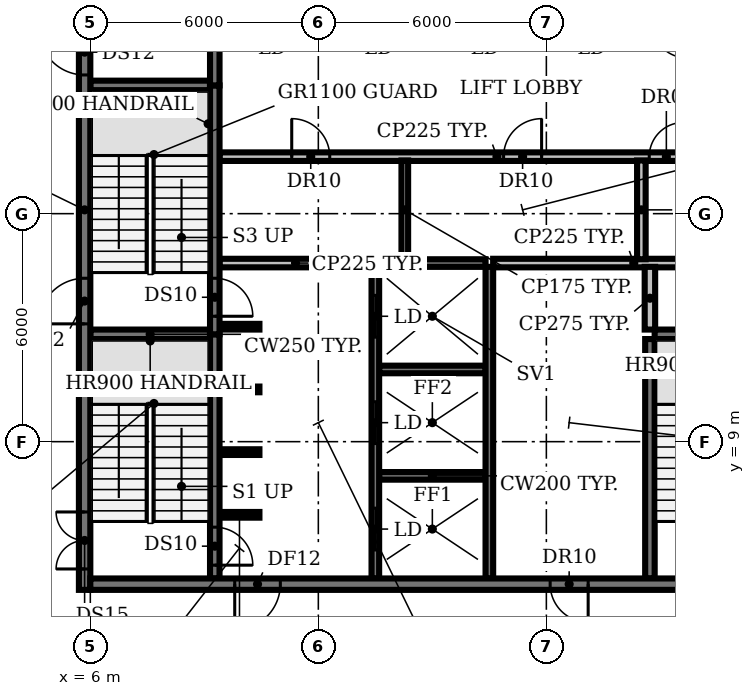
"""IFC4 building model, lengths in metres.
Left out: names, types, materials, properties, quantities, classifications, styles, units other than length and angle.
Written with IfcOpenShell. Run it as: python <this file> out.ifc"""

import sys

from ifc_helpers import new_model, si_unit, direction, frame, frame_2d, origin, place, context, subcontext, project, spatial, rectangle, extrude, element, fill, save


model = new_model("IFC4")
c1 = context("Model", 3, precision=1e-05, world=origin(), true_north=direction((0.0, 1.0)))
c2 = subcontext(c1, "Body", "Model", "MODEL_VIEW")
j1 = project(units=[si_unit("LENGTHUNIT", "METRE"), si_unit("PLANEANGLEUNIT", "RADIAN")], contexts=[c1])
p1 = place(None, origin())
s1 = spatial("IfcSite", under=j1, at=p1, CompositionType="ELEMENT")
p2 = place(p1, origin())
s2 = spatial("IfcBuilding", under=s1, at=p2, CompositionType="ELEMENT")
p3 = place(p2, frame((0.0, 0.0, 264.2)))
s3 = spatial("IfcBuildingStorey", under=s2, at=p3, CompositionType="ELEMENT", Elevation=264.2)
p4 = place(p3, frame((9.4, 7.075, 0.0), z_axis=(0.0, 0.0, 1.0), x_axis=(1.0, 0.0, 0.0)))
e1 = element("IfcWall", 1, at=p4, inside=s3, PredefinedType="SHEAR", context=c2, shape_type="SweptSolid", body=[
    extrude(rectangle(XDim=1.05, YDim=0.15, at=frame_2d((0.525, 0.0))), origin(), (0.0, 0.0, 1.0), 3.85),
])
p5 = place(p3, frame((13.6, 8.1, 0.0), z_axis=(0.0, 0.0, 1.0), x_axis=(1.0, 0.0, 0.0)))
e2 = element("IfcWall", 2, at=p5, inside=s3, PredefinedType="SHEAR", context=c2, shape_type="SweptSolid", body=[
    extrude(rectangle(XDim=2.8, YDim=0.2, at=frame_2d((1.4, 0.0))), origin(), (0.0, 0.0, 1.0), 3.85),
])
for number, where, z_axis, x_axis in (
    (3, (9.4, 8.725, 0.0), (0.0, 0.0, 1.0), (1.0, 0.0, 0.0)),
    (4, (9.4, 10.375, 0.0), (0.0, 0.0, 1.0), (1.0, 0.0, 0.0)),
):
    element("IfcWall", number, at=place(p3, frame(where, z_axis=z_axis, x_axis=x_axis)), inside=s3, PredefinedType="SHEAR", context=c2, shape_type="SweptSolid", body=[
        extrude(rectangle(XDim=1.05, YDim=0.15, at=frame_2d((0.525, 0.0))), origin(), (0.0, 0.0, 1.0), 3.85),
    ])
p6 = place(p3, frame((13.6, 10.9, 0.0), z_axis=(0.0, 0.0, 1.0), x_axis=(1.0, 0.0, 0.0)))
e5 = element("IfcWall", 5, at=p6, inside=s3, PredefinedType="SHEAR", context=c2, shape_type="SweptSolid", body=[
    extrude(rectangle(XDim=2.8, YDim=0.2, at=frame_2d((1.4, 0.0))), origin(), (0.0, 0.0, 1.0), 3.85),
])
for number, where, z_axis, x_axis in (
    (6, (6.0, 11.825, 0.0), (0.0, 0.0, 1.0), (1.0, 0.0, 0.0)),
    (7, (20.85, 11.825, 0.0), (0.0, 0.0, 1.0), (1.0, 0.0, 0.0)),
):
    element("IfcWall", number, at=place(p3, frame(where, z_axis=z_axis, x_axis=x_axis)), inside=s3, PredefinedType="SHEAR", context=c2, shape_type="SweptSolid", body=[
        extrude(rectangle(XDim=3.15, YDim=0.25, at=frame_2d((1.575, 0.0))), origin(), (0.0, 0.0, 1.0), 3.85),
    ])
p7 = place(p3, frame((9.4, 12.025, 0.0), z_axis=(0.0, 0.0, 1.0), x_axis=(1.0, 0.0, 0.0)))
e8 = element("IfcWall", 8, at=p7, inside=s3, PredefinedType="SHEAR", context=c2, shape_type="SweptSolid", body=[
    extrude(rectangle(XDim=1.05, YDim=0.15, at=frame_2d((0.525, 0.0))), origin(), (0.0, 0.0, 1.0), 3.85),
])
p8 = place(p3, frame((9.4, 13.7, 0.0), z_axis=(0.0, 0.0, 1.0), x_axis=(1.0, 0.0, 0.0)))
e9 = element("IfcWall", 9, at=p8, inside=s3, PredefinedType="PARTITIONING", context=c2, shape_type="SweptSolid", body=[
    extrude(rectangle(XDim=4.0, YDim=0.225, at=frame_2d((2.0, 0.0))), origin(), (0.0, 0.0, 1.0), 3.85),
])
p9 = place(p3, frame((13.6, 13.7, 0.0), z_axis=(0.0, 0.0, 1.0), x_axis=(1.0, 0.0, 0.0)))
e10 = element("IfcWall", 10, at=p9, inside=s3, PredefinedType="SHEAR", context=c2, shape_type="SweptSolid", body=[
    extrude(rectangle(XDim=2.8, YDim=0.2, at=frame_2d((1.4, 0.0))), origin(), (0.0, 0.0, 1.0), 3.85),
])
p10 = place(p3, frame((16.6, 13.7, 0.0), z_axis=(0.0, 0.0, 1.0), x_axis=(1.0, 0.0, 0.0)))
e11 = element("IfcWall", 11, at=p10, inside=s3, PredefinedType="PARTITIONING", context=c2, shape_type="SweptSolid", body=[
    extrude(rectangle(XDim=7.4, YDim=0.225, at=frame_2d((3.7, 0.0))), origin(), (0.0, 0.0, 1.0), 3.85),
])
p11 = place(p3, frame((9.4, 16.5, 0.0), z_axis=(0.0, 0.0, 1.0), x_axis=(1.0, 0.0, 0.0)))
e12 = element("IfcWall", 12, at=p11, inside=s3, PredefinedType="PARTITIONING", context=c2, shape_type="SweptSolid", body=[
    extrude(rectangle(XDim=14.6, YDim=0.225, at=frame_2d((7.3, 0.0))), origin(), (0.0, 0.0, 1.0), 3.85),
])
p12 = place(p11, frame((1.9, 0.0, 0.0)))
e13 = element("IfcOpeningElement", 13, at=p12, cuts=e12, PredefinedType="OPENING", context=c2, shape_type="SweptSolid", body=[
    extrude(rectangle(XDim=1.0, YDim=2.1, at=frame_2d((0.5, 1.05))), frame((0.0, 0.123, 0.0), z_axis=(0.0, -1.0, 0.0), x_axis=(1.0, 0.0, 0.0)), (0.0, 0.0, 1.0), 0.245),
])
p13 = place(p11, frame((7.475, 0.0, 0.0)))
e14 = element("IfcOpeningElement", 14, at=p13, cuts=e12, PredefinedType="OPENING", context=c2, shape_type="SweptSolid", body=[
    extrude(rectangle(XDim=1.0, YDim=2.1, at=frame_2d((0.5, 1.05))), frame((0.0, 0.123, 0.0), z_axis=(0.0, -1.0, 0.0), x_axis=(1.0, 0.0, 0.0)), (0.0, 0.0, 1.0), 0.245),
])
p14 = place(p11, frame((11.308, 0.0, 0.0)))
e15 = element("IfcOpeningElement", 15, at=p14, cuts=e12, PredefinedType="OPENING", context=c2, shape_type="SweptSolid", body=[
    extrude(rectangle(XDim=0.9, YDim=2.1, at=frame_2d((0.45, 1.05))), frame((0.0, 0.123, 0.0), z_axis=(0.0, -1.0, 0.0), x_axis=(1.0, 0.0, 0.0)), (0.0, 0.0, 1.0), 0.245),
])
p15 = place(p11, frame((13.083, 0.0, 0.0)))
e16 = element("IfcOpeningElement", 16, at=p15, cuts=e12, PredefinedType="OPENING", context=c2, shape_type="SweptSolid", body=[
    extrude(rectangle(XDim=0.9, YDim=2.1, at=frame_2d((0.45, 1.05))), frame((0.0, 0.123, 0.0), z_axis=(0.0, -1.0, 0.0), x_axis=(1.0, 0.0, 0.0)), (0.0, 0.0, 1.0), 0.245),
])
p16 = place(p3, frame((6.0, 18.375, 0.0), z_axis=(0.0, 0.0, 1.0), x_axis=(1.0, 0.0, 0.0)))
e17 = element("IfcWall", 17, at=p16, inside=s3, PredefinedType="SHEAR", context=c2, shape_type="SweptSolid", body=[
    extrude(rectangle(XDim=3.15, YDim=0.25, at=frame_2d((1.575, 0.0))), origin(), (0.0, 0.0, 1.0), 3.85),
])
p17 = place(p3, frame((9.275, 11.825, 0.0), z_axis=(0.0, 0.0, 1.0), x_axis=(0.0, -1.0, 0.0)))
e18 = element("IfcWall", 18, at=p17, inside=s3, PredefinedType="SHEAR", context=c2, shape_type="SweptSolid", body=[
    extrude(rectangle(XDim=6.425, YDim=0.25, at=frame_2d((3.212, 0.0))), origin(), (0.0, 0.0, 1.0), 3.85),
])
p18 = place(p17, frame((5.075, 0.0, 0.0)))
e19 = element("IfcOpeningElement", 19, at=p18, cuts=e18, PredefinedType="OPENING", context=c2, shape_type="SweptSolid", body=[
    extrude(rectangle(XDim=1.0, YDim=2.1, at=frame_2d((0.5, 1.05))), frame((0.0, 0.135, 0.0), z_axis=(0.0, -1.0, 0.0), x_axis=(1.0, 0.0, 0.0)), (0.0, 0.0, 1.0), 0.27),
])
p19 = place(p3, frame((9.275, 18.375, 0.0), z_axis=(0.0, 0.0, 1.0), x_axis=(0.0, -1.0, 0.0)))
e20 = element("IfcWall", 20, at=p19, inside=s3, PredefinedType="SHEAR", context=c2, shape_type="SweptSolid", body=[
    extrude(rectangle(XDim=6.55, YDim=0.25, at=frame_2d((3.275, 0.0))), origin(), (0.0, 0.0, 1.0), 3.85),
])
p20 = place(p19, frame((5.075, 0.0, 0.0)))
e21 = element("IfcOpeningElement", 21, at=p20, cuts=e20, PredefinedType="OPENING", context=c2, shape_type="SweptSolid", body=[
    extrude(rectangle(XDim=1.0, YDim=2.1, at=frame_2d((0.5, 1.05))), frame((0.0, 0.135, 0.0), z_axis=(0.0, -1.0, 0.0), x_axis=(1.0, 0.0, 0.0)), (0.0, 0.0, 1.0), 0.27),
])
p21 = place(p3, frame((9.275, 18.375, 0.0), z_axis=(0.0, 0.0, 1.0), x_axis=(0.0, 1.0, 0.0)))
e22 = element("IfcWall", 22, at=p21, inside=s3, PredefinedType="SHEAR", context=c2, shape_type="SweptSolid", body=[
    extrude(rectangle(XDim=6.425, YDim=0.25, at=frame_2d((3.212, 0.0))), origin(), (0.0, 0.0, 1.0), 3.85),
])
p22 = place(p3, frame((13.5, 5.4, 0.0), z_axis=(0.0, 0.0, 1.0), x_axis=(0.0, 1.0, 0.0)))
e23 = element("IfcWall", 23, at=p22, inside=s3, PredefinedType="SHEAR", context=c2, shape_type="SweptSolid", body=[
    extrude(rectangle(XDim=8.2, YDim=0.2, at=frame_2d((4.1, 0.0))), origin(), (0.0, 0.0, 1.0), 3.85),
])
p23 = place(p22, frame((0.75, 0.0, 0.0)))
e24 = element("IfcOpeningElement", 24, at=p23, cuts=e23, PredefinedType="OPENING", context=c2, shape_type="SweptSolid", body=[
    extrude(rectangle(XDim=1.1, YDim=2.1, at=frame_2d((0.55, 1.05))), frame((0.0, 0.11, 0.0), z_axis=(0.0, -1.0, 0.0), x_axis=(1.0, 0.0, 0.0)), (0.0, 0.0, 1.0), 0.22),
])
p24 = place(p22, frame((3.55, 0.0, 0.0)))
e25 = element("IfcOpeningElement", 25, at=p24, cuts=e23, PredefinedType="OPENING", context=c2, shape_type="SweptSolid", body=[
    extrude(rectangle(XDim=1.1, YDim=2.1, at=frame_2d((0.55, 1.05))), frame((0.0, 0.11, 0.0), z_axis=(0.0, -1.0, 0.0), x_axis=(1.0, 0.0, 0.0)), (0.0, 0.0, 1.0), 0.22),
])
p25 = place(p22, frame((6.35, 0.0, 0.0)))
e26 = element("IfcOpeningElement", 26, at=p25, cuts=e23, PredefinedType="OPENING", context=c2, shape_type="SweptSolid", body=[
    extrude(rectangle(XDim=1.1, YDim=2.1, at=frame_2d((0.55, 1.05))), frame((0.0, 0.11, 0.0), z_axis=(0.0, -1.0, 0.0), x_axis=(1.0, 0.0, 0.0)), (0.0, 0.0, 1.0), 0.22),
])
p26 = place(p3, frame((14.275, 13.8, 0.0), z_axis=(0.0, 0.0, 1.0), x_axis=(0.0, 1.0, 0.0)))
e27 = element("IfcWall", 27, at=p26, inside=s3, PredefinedType="PARTITIONING", context=c2, shape_type="SweptSolid", body=[
    extrude(rectangle(XDim=2.6, YDim=0.175, at=frame_2d((1.3, 0.0))), origin(), (0.0, 0.0, 1.0), 3.85),
])
p27 = place(p3, frame((16.5, 5.4, 0.0), z_axis=(0.0, 0.0, 1.0), x_axis=(0.0, 1.0, 0.0)))
e28 = element("IfcWall", 28, at=p27, inside=s3, PredefinedType="SHEAR", context=c2, shape_type="SweptSolid", body=[
    extrude(rectangle(XDim=8.2, YDim=0.2, at=frame_2d((4.1, 0.0))), origin(), (0.0, 0.0, 1.0), 3.85),
])
p28 = place(p3, frame((20.5, 13.8, 0.0), z_axis=(0.0, 0.0, 1.0), x_axis=(0.0, 1.0, 0.0)))
e29 = element("IfcWall", 29, at=p28, inside=s3, PredefinedType="PARTITIONING", context=c2, shape_type="SweptSolid", body=[
    extrude(rectangle(XDim=2.6, YDim=0.225, at=frame_2d((1.3, 0.0))), origin(), (0.0, 0.0, 1.0), 3.85),
])
p29 = place(p3, frame((20.725, 5.4, 0.0), z_axis=(0.0, 0.0, 1.0), x_axis=(0.0, 1.0, 0.0)))
e30 = element("IfcWall", 30, at=p29, inside=s3, PredefinedType="SHEAR", context=c2, shape_type="SweptSolid", body=[
    extrude(rectangle(XDim=6.3, YDim=0.25, at=frame_2d((3.15, 0.0))), origin(), (0.0, 0.0, 1.0), 3.85),
])
p30 = place(p3, frame((20.725, 11.95, 0.0), z_axis=(0.0, 0.0, 1.0), x_axis=(0.0, 1.0, 0.0)))
e31 = element("IfcWall", 31, at=p30, inside=s3, PredefinedType="PARTITIONING", context=c2, shape_type="SweptSolid", body=[
    extrude(rectangle(XDim=1.65, YDim=0.275, at=frame_2d((0.825, 0.0))), origin(), (0.0, 0.0, 1.0), 3.85),
])
p31 = place(p3, frame((5.85, 5.1, 0.0), z_axis=(0.0, 0.0, 1.0), x_axis=(0.0, 1.0, 0.0)))
e32 = element("IfcWall", 32, at=p31, inside=s3, PredefinedType="SHEAR", context=c2, shape_type="SweptSolid", body=[
    extrude(rectangle(XDim=20.0, YDim=0.3, at=frame_2d((10.0, 0.0))), origin(), (0.0, 0.0, 1.0), 3.85),
])
p32 = place(p31, frame((0.55, 0.0, 0.0)))
e33 = element("IfcOpeningElement", 33, at=p32, cuts=e32, PredefinedType="OPENING", context=c2, shape_type="SweptSolid", body=[
    extrude(rectangle(XDim=1.5, YDim=2.1, at=frame_2d((0.75, 1.05))), frame((0.0, 0.16, 0.0), z_axis=(0.0, -1.0, 0.0), x_axis=(1.0, 0.0, 0.0)), (0.0, 0.0, 1.0), 0.32),
])
p33 = place(p31, frame((7.0, 0.0, 0.0)))
e34 = element("IfcOpeningElement", 34, at=p33, cuts=e32, PredefinedType="OPENING", context=c2, shape_type="SweptSolid", body=[
    extrude(rectangle(XDim=1.2, YDim=2.1, at=frame_2d((0.6, 1.05))), frame((0.0, 0.16, 0.0), z_axis=(0.0, -1.0, 0.0), x_axis=(1.0, 0.0, 0.0)), (0.0, 0.0, 1.0), 0.32),
])
p34 = place(p31, frame((13.55, 0.0, 0.0)))
e35 = element("IfcOpeningElement", 35, at=p34, cuts=e32, PredefinedType="OPENING", context=c2, shape_type="SweptSolid", body=[
    extrude(rectangle(XDim=1.2, YDim=2.1, at=frame_2d((0.6, 1.05))), frame((0.0, 0.16, 0.0), z_axis=(0.0, -1.0, 0.0), x_axis=(1.0, 0.0, 0.0)), (0.0, 0.0, 1.0), 0.32),
])
p35 = place(p3, frame((24.0, 5.25, 0.0), z_axis=(0.0, 0.0, 1.0), x_axis=(-1.0, 0.0, 0.0)))
e36 = element("IfcWall", 36, at=p35, inside=s3, PredefinedType="SHEAR", context=c2, shape_type="SweptSolid", body=[
    extrude(rectangle(XDim=18.0, YDim=0.3, at=frame_2d((9.0, 0.0))), origin(), (0.0, 0.0, 1.0), 3.85),
])
p36 = place(p35, frame((13.0, 0.0, 0.0)))
e37 = element("IfcOpeningElement", 37, at=p36, cuts=e36, PredefinedType="OPENING", context=c2, shape_type="SweptSolid", body=[
    extrude(rectangle(XDim=1.2, YDim=2.1, at=frame_2d((0.6, 1.05))), frame((0.0, 0.16, 0.0), z_axis=(0.0, -1.0, 0.0), x_axis=(1.0, 0.0, 0.0)), (0.0, 0.0, 1.0), 0.32),
])
p37 = place(p35, frame((4.9, 0.0, 0.0)))
e38 = element("IfcOpeningElement", 38, at=p37, cuts=e36, PredefinedType="OPENING", context=c2, shape_type="SweptSolid", body=[
    extrude(rectangle(XDim=1.0, YDim=2.1, at=frame_2d((0.5, 1.05))), frame((0.0, 0.16, 0.0), z_axis=(0.0, -1.0, 0.0), x_axis=(1.0, 0.0, 0.0)), (0.0, 0.0, 1.0), 0.32),
])
p38 = place(p12, origin())
e39 = element("IfcDoor", 39, at=p38, inside=s3, OperationType="SINGLE_SWING_LEFT", PredefinedType="DOOR", context=c2, shape_type="SweptSolid", body=[
    extrude(rectangle(XDim=1.0, YDim=2.1, at=frame_2d((0.5, 1.05))), frame((0.0, 0.025, 0.0), z_axis=(0.0, -1.0, 0.0), x_axis=(1.0, 0.0, 0.0)), (0.0, 0.0, 1.0), 0.05),
])
fill(e13, e39)
p39 = place(p13, origin())
e40 = element("IfcDoor", 40, at=p39, inside=s3, OperationType="SINGLE_SWING_RIGHT", PredefinedType="DOOR", context=c2, shape_type="SweptSolid", body=[
    extrude(rectangle(XDim=1.0, YDim=2.1, at=frame_2d((0.5, 1.05))), frame((0.0, 0.025, 0.0), z_axis=(0.0, -1.0, 0.0), x_axis=(1.0, 0.0, 0.0)), (0.0, 0.0, 1.0), 0.05),
])
fill(e14, e40)
p40 = place(p14, origin())
e41 = element("IfcDoor", 41, at=p40, inside=s3, OperationType="SINGLE_SWING_RIGHT", PredefinedType="DOOR", context=c2, shape_type="SweptSolid", body=[
    extrude(rectangle(XDim=0.9, YDim=2.1, at=frame_2d((0.45, 1.05))), frame((0.0, 0.025, 0.0), z_axis=(0.0, -1.0, 0.0), x_axis=(1.0, 0.0, 0.0)), (0.0, 0.0, 1.0), 0.05),
])
fill(e15, e41)
p41 = place(p18, origin())
e42 = element("IfcDoor", 42, at=p41, inside=s3, OperationType="SINGLE_SWING_RIGHT", PredefinedType="DOOR", context=c2, shape_type="SweptSolid", body=[
    extrude(rectangle(XDim=1.0, YDim=2.1, at=frame_2d((0.5, 1.05))), frame((0.0, 0.025, 0.0), z_axis=(0.0, -1.0, 0.0), x_axis=(1.0, 0.0, 0.0)), (0.0, 0.0, 1.0), 0.05),
])
fill(e19, e42)
p42 = place(p20, origin())
e43 = element("IfcDoor", 43, at=p42, inside=s3, OperationType="SINGLE_SWING_RIGHT", PredefinedType="DOOR", context=c2, shape_type="SweptSolid", body=[
    extrude(rectangle(XDim=1.0, YDim=2.1, at=frame_2d((0.5, 1.05))), frame((0.0, 0.025, 0.0), z_axis=(0.0, -1.0, 0.0), x_axis=(1.0, 0.0, 0.0)), (0.0, 0.0, 1.0), 0.05),
])
fill(e21, e43)
p43 = place(p23, origin())
e44 = element("IfcDoor", 44, at=p43, inside=s3, OperationType="DOUBLE_DOOR_SLIDING", PredefinedType="DOOR", context=c2, shape_type="SweptSolid", body=[
    extrude(rectangle(XDim=1.1, YDim=2.1, at=frame_2d((0.55, 1.05))), frame((0.0, 0.025, 0.0), z_axis=(0.0, -1.0, 0.0), x_axis=(1.0, 0.0, 0.0)), (0.0, 0.0, 1.0), 0.05),
])
fill(e24, e44)
p44 = place(p24, origin())
e45 = element("IfcDoor", 45, at=p44, inside=s3, OperationType="DOUBLE_DOOR_SLIDING", PredefinedType="DOOR", context=c2, shape_type="SweptSolid", body=[
    extrude(rectangle(XDim=1.1, YDim=2.1, at=frame_2d((0.55, 1.05))), frame((0.0, 0.025, 0.0), z_axis=(0.0, -1.0, 0.0), x_axis=(1.0, 0.0, 0.0)), (0.0, 0.0, 1.0), 0.05),
])
fill(e25, e45)
p45 = place(p25, origin())
e46 = element("IfcDoor", 46, at=p45, inside=s3, OperationType="DOUBLE_DOOR_SLIDING", PredefinedType="DOOR", context=c2, shape_type="SweptSolid", body=[
    extrude(rectangle(XDim=1.1, YDim=2.1, at=frame_2d((0.55, 1.05))), frame((0.0, 0.025, 0.0), z_axis=(0.0, -1.0, 0.0), x_axis=(1.0, 0.0, 0.0)), (0.0, 0.0, 1.0), 0.05),
])
fill(e26, e46)
p46 = place(p32, origin())
e47 = element("IfcDoor", 47, at=p46, inside=s3, OperationType="DOUBLE_DOOR_SINGLE_SWING", PredefinedType="DOOR", context=c2, shape_type="SweptSolid", body=[
    extrude(rectangle(XDim=1.5, YDim=2.1, at=frame_2d((0.75, 1.05))), frame((0.0, 0.025, 0.0), z_axis=(0.0, -1.0, 0.0), x_axis=(1.0, 0.0, 0.0)), (0.0, 0.0, 1.0), 0.05),
])
fill(e33, e47)
p47 = place(p33, origin())
e48 = element("IfcDoor", 48, at=p47, inside=s3, OperationType="SINGLE_SWING_LEFT", PredefinedType="DOOR", context=c2, shape_type="SweptSolid", body=[
    extrude(rectangle(XDim=1.2, YDim=2.1, at=frame_2d((0.6, 1.05))), frame((0.0, 0.025, 0.0), z_axis=(0.0, -1.0, 0.0), x_axis=(1.0, 0.0, 0.0)), (0.0, 0.0, 1.0), 0.05),
])
fill(e34, e48)
p48 = place(p34, origin())
e49 = element("IfcDoor", 49, at=p48, inside=s3, OperationType="SINGLE_SWING_RIGHT", PredefinedType="DOOR", context=c2, shape_type="SweptSolid", body=[
    extrude(rectangle(XDim=1.2, YDim=2.1, at=frame_2d((0.6, 1.05))), frame((0.0, 0.025, 0.0), z_axis=(0.0, -1.0, 0.0), x_axis=(1.0, 0.0, 0.0)), (0.0, 0.0, 1.0), 0.05),
])
fill(e35, e49)
p49 = place(p36, origin())
e50 = element("IfcDoor", 50, at=p49, inside=s3, OperationType="SINGLE_SWING_RIGHT", PredefinedType="DOOR", context=c2, shape_type="SweptSolid", body=[
    extrude(rectangle(XDim=1.2, YDim=2.1, at=frame_2d((0.6, 1.05))), frame((0.0, 0.025, 0.0), z_axis=(0.0, -1.0, 0.0), x_axis=(1.0, 0.0, 0.0)), (0.0, 0.0, 1.0), 0.05),
])
fill(e37, e50)
p50 = place(p37, origin())
e51 = element("IfcDoor", 51, at=p50, inside=s3, OperationType="SINGLE_SWING_LEFT", PredefinedType="DOOR", context=c2, shape_type="SweptSolid", body=[
    extrude(rectangle(XDim=1.0, YDim=2.1, at=frame_2d((0.5, 1.05))), frame((0.0, 0.025, 0.0), z_axis=(0.0, -1.0, 0.0), x_axis=(1.0, 0.0, 0.0)), (0.0, 0.0, 1.0), 0.05),
])
fill(e38, e51)
save(model, sys.argv[1])
